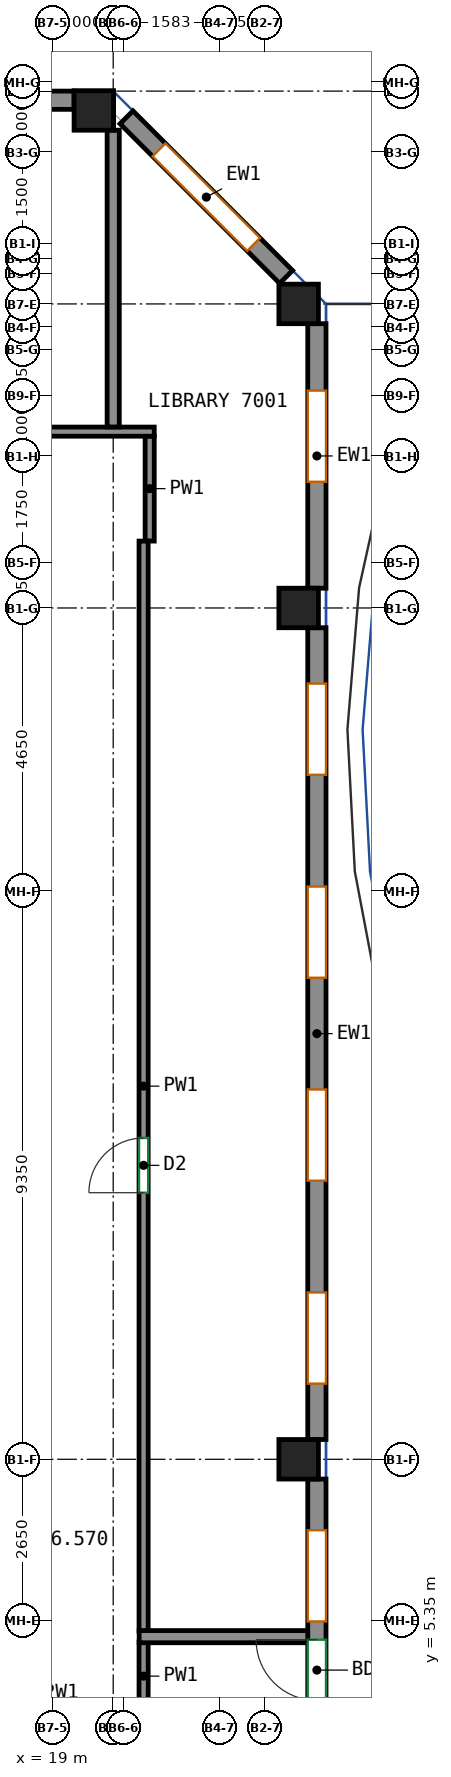
"""IFC4 building model, lengths in metres.
Left out: names, types, materials, properties, quantities, classifications, styles, units other than length and angle.
Written with IfcOpenShell. Run it as: python <this file> out.ifc"""

import sys

from ifc_helpers import new_model, si_unit, direction, frame, frame_2d, origin, origin_2d, place, context, subcontext, project, spatial, rectangle, extrude, source, transform, mapped, element, fill, save


model = new_model("IFC4")
c1 = context("Model", 3, precision=1e-05, world=origin(), true_north=direction((0.0, 1.0)))
c2 = subcontext(c1, "Body", "Model", "MODEL_VIEW")
j1 = project(units=[si_unit("LENGTHUNIT", "METRE"), si_unit("PLANEANGLEUNIT", "RADIAN")], contexts=[c1])
p1 = place(None, origin())
s1 = spatial("IfcSite", under=j1, at=p1, CompositionType="ELEMENT")
p2 = place(p1, origin())
s2 = spatial("IfcBuilding", under=s1, at=p2, CompositionType="ELEMENT")
p3 = place(p2, frame((0.0, 0.0, 284.0)))
s3 = spatial("IfcBuildingStorey", under=s2, at=p3, CompositionType="ELEMENT", Elevation=284.0)
m1 = source(origin(), c2, "Body", "SweptSolid", [
    extrude(rectangle(XDim=0.65, YDim=0.65, at=origin_2d()), origin(), (0.0, 0.0, 1.0), 3.12),
])
for number, where, z_axis, x_axis in (
    (1, (19.682, 30.182, 0.0), (0.0, 0.0, 1.0), (1.0, 0.0, 0.0)),
    (2, (23.05, 8.0, 0.0), (0.0, 0.0, 1.0), (1.0, 0.0, 0.0)),
    (3, (23.05, 22.0, 0.0), (0.0, 0.0, 1.0), (1.0, 0.0, 0.0)),
    (4, (23.05, 27.0, 0.0), (0.0, 0.0, 1.0), (1.0, 0.0, 0.0)),
):
    element("IfcColumn", number, at=place(p3, frame(where, z_axis=z_axis, x_axis=x_axis)), inside=s3, PredefinedType="COLUMN", context=c2, shape_type="MappedRepresentation", body=[
        mapped(m1, transform((0.0, 0.0, 0.0))),
    ])
m2 = source(origin(), c2, "Body", "SweptSolid", [
    extrude(rectangle(XDim=8.183, YDim=0.3, at=frame_2d((4.092, 0.0))), origin(), (0.0, 0.0, 1.0), 3.12),
])
p4 = place(p3, frame((23.35, -0.508, 0.0), z_axis=(0.0, 0.0, 1.0), x_axis=(0.0, 1.0, 0.0)))
e5 = element("IfcWall", 5, at=p4, inside=s3, PredefinedType="SOLIDWALL", context=c2, shape_type="MappedRepresentation", body=[
    mapped(m2, transform((0.0, 0.0, 0.0))),
])
p5 = place(p4, frame((1.75, 0.0, 0.8)))
e6 = element("IfcOpeningElement", 6, at=p5, cuts=e5, PredefinedType="OPENING", context=c2, shape_type="SweptSolid", body=[
    extrude(rectangle(XDim=1.5, YDim=2.05, at=frame_2d((0.75, 1.025))), frame((0.0, 0.16, 0.0), z_axis=(0.0, -1.0, 0.0), x_axis=(1.0, 0.0, 0.0)), (0.0, 0.0, 1.0), 0.32),
])
p6 = place(p4, frame((0.45, 0.0, 0.0)))
e7 = element("IfcOpeningElement", 7, at=p6, cuts=e5, PredefinedType="OPENING", context=c2, shape_type="SweptSolid", body=[
    extrude(rectangle(XDim=1.0, YDim=2.1, at=frame_2d((0.5, 1.05))), frame((0.0, 0.16, 0.0), z_axis=(0.0, -1.0, 0.0), x_axis=(1.0, 0.0, 0.0)), (0.0, 0.0, 1.0), 0.32),
])
p7 = place(p4, frame((5.842, 0.0, 0.8)))
e8 = element("IfcOpeningElement", 8, at=p7, cuts=e5, PredefinedType="OPENING", context=c2, shape_type="SweptSolid", body=[
    extrude(rectangle(XDim=1.5, YDim=2.05, at=frame_2d((0.75, 1.025))), frame((0.0, 0.16, 0.0), z_axis=(0.0, -1.0, 0.0), x_axis=(1.0, 0.0, 0.0)), (0.0, 0.0, 1.0), 0.32),
])
p8 = place(p4, frame((4.542, 0.0, 0.0)))
e9 = element("IfcOpeningElement", 9, at=p8, cuts=e5, PredefinedType="OPENING", context=c2, shape_type="SweptSolid", body=[
    extrude(rectangle(XDim=1.0, YDim=2.1, at=frame_2d((0.5, 1.05))), frame((0.0, 0.16, 0.0), z_axis=(0.0, -1.0, 0.0), x_axis=(1.0, 0.0, 0.0)), (0.0, 0.0, 1.0), 0.32),
])
m3 = source(origin(), c2, "Body", "SweptSolid", [
    extrude(rectangle(XDim=13.35, YDim=0.3, at=frame_2d((6.675, 0.0))), origin(), (0.0, 0.0, 1.0), 3.12),
])
p9 = place(p3, frame((23.35, 8.325, 0.0), z_axis=(0.0, 0.0, 1.0), x_axis=(0.0, 1.0, 0.0)))
e10 = element("IfcWall", 10, at=p9, inside=s3, PredefinedType="SOLIDWALL", context=c2, shape_type="MappedRepresentation", body=[
    mapped(m3, transform((0.0, 0.0, 0.0))),
])
p10 = place(p9, frame((0.919, 0.0, 0.8)))
e11 = element("IfcOpeningElement", 11, at=p10, cuts=e10, PredefinedType="OPENING", context=c2, shape_type="SweptSolid", body=[
    extrude(rectangle(XDim=1.5, YDim=2.05, at=frame_2d((0.75, 1.025))), frame((0.0, 0.16, 0.0), z_axis=(0.0, -1.0, 0.0), x_axis=(1.0, 0.0, 0.0)), (0.0, 0.0, 1.0), 0.32),
])
p11 = place(p9, frame((4.256, 0.0, 0.8)))
e12 = element("IfcOpeningElement", 12, at=p11, cuts=e10, PredefinedType="OPENING", context=c2, shape_type="SweptSolid", body=[
    extrude(rectangle(XDim=1.5, YDim=2.05, at=frame_2d((0.75, 1.025))), frame((0.0, 0.16, 0.0), z_axis=(0.0, -1.0, 0.0), x_axis=(1.0, 0.0, 0.0)), (0.0, 0.0, 1.0), 0.32),
])
p12 = place(p9, frame((7.594, 0.0, 0.8)))
e13 = element("IfcOpeningElement", 13, at=p12, cuts=e10, PredefinedType="OPENING", context=c2, shape_type="SweptSolid", body=[
    extrude(rectangle(XDim=1.5, YDim=2.05, at=frame_2d((0.75, 1.025))), frame((0.0, 0.16, 0.0), z_axis=(0.0, -1.0, 0.0), x_axis=(1.0, 0.0, 0.0)), (0.0, 0.0, 1.0), 0.32),
])
p13 = place(p9, frame((10.931, 0.0, 0.8)))
e14 = element("IfcOpeningElement", 14, at=p13, cuts=e10, PredefinedType="OPENING", context=c2, shape_type="SweptSolid", body=[
    extrude(rectangle(XDim=1.5, YDim=2.05, at=frame_2d((0.75, 1.025))), frame((0.0, 0.16, 0.0), z_axis=(0.0, -1.0, 0.0), x_axis=(1.0, 0.0, 0.0)), (0.0, 0.0, 1.0), 0.32),
])
m4 = source(origin(), c2, "Body", "SweptSolid", [
    extrude(rectangle(XDim=4.35, YDim=0.3, at=frame_2d((2.175, 0.0))), origin(), (0.0, 0.0, 1.0), 3.12),
])
p14 = place(p3, frame((23.35, 22.325, 0.0), z_axis=(0.0, 0.0, 1.0), x_axis=(0.0, 1.0, 0.0)))
e15 = element("IfcWall", 15, at=p14, inside=s3, PredefinedType="SOLIDWALL", context=c2, shape_type="MappedRepresentation", body=[
    mapped(m4, transform((0.0, 0.0, 0.0))),
])
p15 = place(p14, frame((1.75, 0.0, 0.8)))
e16 = element("IfcOpeningElement", 16, at=p15, cuts=e15, PredefinedType="OPENING", context=c2, shape_type="SweptSolid", body=[
    extrude(rectangle(XDim=1.5, YDim=2.05, at=frame_2d((0.75, 1.025))), frame((0.0, 0.16, 0.0), z_axis=(0.0, -1.0, 0.0), x_axis=(1.0, 0.0, 0.0)), (0.0, 0.0, 1.0), 0.32),
])
m5 = source(origin(), c2, "Body", "SweptSolid", [
    extrude(rectangle(XDim=3.712, YDim=0.3, at=frame_2d((1.856, 0.0))), origin(), (0.0, 0.0, 1.0), 3.12),
])
p16 = place(p3, frame((22.844, 27.444, 0.0), z_axis=(0.0, 0.0, 1.0), x_axis=(-0.707106781187, 0.707106781187, 0.0)))
e17 = element("IfcWall", 17, at=p16, inside=s3, PredefinedType="SOLIDWALL", context=c2, shape_type="MappedRepresentation", body=[
    mapped(m5, transform((0.0, 0.0, 0.0))),
])
p17 = place(p16, frame((0.756, 0.0, 0.8)))
e18 = element("IfcOpeningElement", 18, at=p17, cuts=e17, PredefinedType="OPENING", context=c2, shape_type="SweptSolid", body=[
    extrude(rectangle(XDim=2.2, YDim=2.05, at=frame_2d((1.1, 1.025))), frame((0.0, 0.16, 0.0), z_axis=(0.0, -1.0, 0.0), x_axis=(1.0, 0.0, 0.0)), (0.0, 0.0, 1.0), 0.32),
])
m6 = source(origin(), c2, "Body", "SweptSolid", [
    extrude(rectangle(XDim=6.032, YDim=0.3, at=frame_2d((3.016, 0.0))), origin(), (0.0, 0.0, 1.0), 3.12),
])
p18 = place(p3, frame((19.357, 30.35, 0.0), z_axis=(0.0, 0.0, 1.0), x_axis=(-1.0, 0.0, 0.0)))
e19 = element("IfcWall", 19, at=p18, inside=s3, PredefinedType="SOLIDWALL", context=c2, shape_type="MappedRepresentation", body=[
    mapped(m6, transform((0.0, 0.0, 0.0))),
])
p19 = place(p18, frame((0.408, 0.0, 0.8)))
e20 = element("IfcOpeningElement", 20, at=p19, cuts=e19, PredefinedType="OPENING", context=c2, shape_type="SweptSolid", body=[
    extrude(rectangle(XDim=2.2, YDim=2.05, at=frame_2d((1.1, 1.025))), frame((0.0, 0.16, 0.0), z_axis=(0.0, -1.0, 0.0), x_axis=(1.0, 0.0, 0.0)), (0.0, 0.0, 1.0), 0.32),
])
p20 = place(p18, frame((3.424, 0.0, 0.8)))
e21 = element("IfcOpeningElement", 21, at=p20, cuts=e19, PredefinedType="OPENING", context=c2, shape_type="SweptSolid", body=[
    extrude(rectangle(XDim=2.2, YDim=2.05, at=frame_2d((1.1, 1.025))), frame((0.0, 0.16, 0.0), z_axis=(0.0, -1.0, 0.0), x_axis=(1.0, 0.0, 0.0)), (0.0, 0.0, 1.0), 0.32),
])
p21 = place(p3, frame((20.5, 3.875, 0.0), z_axis=(0.0, 0.0, 1.0), x_axis=(0.0, 1.0, 0.0)))
e22 = element("IfcWall", 22, at=p21, inside=s3, PredefinedType="PARTITIONING", context=c2, shape_type="SweptSolid", body=[
    extrude(rectangle(XDim=1.118, YDim=0.15, at=frame_2d((0.559, 0.0))), origin(), (0.0, 0.0, 1.0), 3.12),
])
p22 = place(p3, frame((20.6, 23.1, 0.0), z_axis=(0.0, 0.0, 1.0), x_axis=(0.0, 1.0, 0.0)))
e23 = element("IfcWall", 23, at=p22, inside=s3, PredefinedType="PARTITIONING", context=c2, shape_type="SweptSolid", body=[
    extrude(rectangle(XDim=1.725, YDim=0.15, at=frame_2d((0.862, 0.0))), origin(), (0.0, 0.0, 1.0), 3.12),
])
p23 = place(p3, frame((20.5, 5.173, 0.0), z_axis=(0.0, 0.0, 1.0), x_axis=(0.0, 1.0, 0.0)))
e24 = element("IfcWall", 24, at=p23, inside=s3, PredefinedType="PARTITIONING", context=c2, shape_type="SweptSolid", body=[
    extrude(rectangle(XDim=17.927, YDim=0.15, at=frame_2d((8.963, 0.0))), origin(), (0.0, 0.0, 1.0), 3.12),
])
p24 = place(p23, frame((7.211, 0.0, 0.0)))
e25 = element("IfcOpeningElement", 25, at=p24, cuts=e24, PredefinedType="OPENING", context=c2, shape_type="SweptSolid", body=[
    extrude(rectangle(XDim=0.9, YDim=2.1, at=frame_2d((0.45, 1.05))), frame((0.0, 0.085, 0.0), z_axis=(0.0, -1.0, 0.0), x_axis=(1.0, 0.0, 0.0)), (0.0, 0.0, 1.0), 0.17),
])
p25 = place(p3, frame((-19.075, 24.9, 0.0), z_axis=(0.0, 0.0, 1.0), x_axis=(1.0, 0.0, 0.0)))
e26 = element("IfcWall", 26, at=p25, inside=s3, PredefinedType="PARTITIONING", context=c2, shape_type="SweptSolid", body=[
    extrude(rectangle(XDim=39.75, YDim=0.15, at=frame_2d((19.875, 0.0))), origin(), (0.0, 0.0, 1.0), 3.12),
])
p26 = place(p25, frame((11.365, 0.0, 0.0)))
e27 = element("IfcOpeningElement", 27, at=p26, cuts=e26, PredefinedType="OPENING", context=c2, shape_type="SweptSolid", body=[
    extrude(rectangle(XDim=1.0, YDim=2.1, at=frame_2d((0.5, 1.05))), frame((0.0, 0.085, 0.0), z_axis=(0.0, -1.0, 0.0), x_axis=(1.0, 0.0, 0.0)), (0.0, 0.0, 1.0), 0.17),
])
p27 = place(p25, frame((33.379, 0.0, 0.0)))
e28 = element("IfcOpeningElement", 28, at=p27, cuts=e26, PredefinedType="OPENING", context=c2, shape_type="SweptSolid", body=[
    extrude(rectangle(XDim=0.9, YDim=2.1, at=frame_2d((0.45, 1.05))), frame((0.0, 0.085, 0.0), z_axis=(0.0, -1.0, 0.0), x_axis=(1.0, 0.0, 0.0)), (0.0, 0.0, 1.0), 0.17),
])
p28 = place(p3, frame((23.25, 5.083, 0.0), z_axis=(0.0, 0.0, 1.0), x_axis=(-1.0, 0.0, 0.0)))
e29 = element("IfcWall", 29, at=p28, inside=s3, PredefinedType="PARTITIONING", context=c2, shape_type="SweptSolid", body=[
    extrude(rectangle(XDim=2.823, YDim=0.2, at=frame_2d((1.412, 0.0))), origin(), (0.0, 0.0, 1.0), 3.12),
])
p29 = place(p3, frame((20.0, 29.857, 0.0), z_axis=(0.0, 0.0, 1.0), x_axis=(0.0, -1.0, 0.0)))
e30 = element("IfcWall", 30, at=p29, inside=s3, PredefinedType="PARTITIONING", context=c2, shape_type="SweptSolid", body=[
    extrude(rectangle(XDim=4.88, YDim=0.2, at=frame_2d((2.44, 0.0))), origin(), (0.0, 0.0, 1.0), 3.12),
])
p30 = place(p7, origin())
e31 = element("IfcWindow", 31, at=p30, inside=s3, PartitioningType="SINGLE_PANEL", PredefinedType="WINDOW", context=c2, shape_type="SweptSolid", body=[
    extrude(rectangle(XDim=1.5, YDim=2.05, at=frame_2d((0.75, 1.025))), frame((0.0, 0.03, 0.0), z_axis=(0.0, -1.0, 0.0), x_axis=(1.0, 0.0, 0.0)), (0.0, 0.0, 1.0), 0.06),
])
fill(e8, e31)
p31 = place(p8, origin())
e32 = element("IfcDoor", 32, at=p31, inside=s3, OperationType="SINGLE_SWING_RIGHT", PredefinedType="DOOR", context=c2, shape_type="SweptSolid", body=[
    extrude(rectangle(XDim=1.0, YDim=2.1, at=frame_2d((0.5, 1.05))), frame((0.0, 0.025, 0.0), z_axis=(0.0, -1.0, 0.0), x_axis=(1.0, 0.0, 0.0)), (0.0, 0.0, 1.0), 0.05),
])
fill(e9, e32)
p32 = place(p10, origin())
e33 = element("IfcWindow", 33, at=p32, inside=s3, PartitioningType="SINGLE_PANEL", PredefinedType="WINDOW", context=c2, shape_type="SweptSolid", body=[
    extrude(rectangle(XDim=1.5, YDim=2.05, at=frame_2d((0.75, 1.025))), frame((0.0, 0.03, 0.0), z_axis=(0.0, -1.0, 0.0), x_axis=(1.0, 0.0, 0.0)), (0.0, 0.0, 1.0), 0.06),
])
fill(e11, e33)
p33 = place(p11, origin())
e34 = element("IfcWindow", 34, at=p33, inside=s3, PartitioningType="SINGLE_PANEL", PredefinedType="WINDOW", context=c2, shape_type="SweptSolid", body=[
    extrude(rectangle(XDim=1.5, YDim=2.05, at=frame_2d((0.75, 1.025))), frame((0.0, 0.03, 0.0), z_axis=(0.0, -1.0, 0.0), x_axis=(1.0, 0.0, 0.0)), (0.0, 0.0, 1.0), 0.06),
])
fill(e12, e34)
p34 = place(p12, origin())
e35 = element("IfcWindow", 35, at=p34, inside=s3, PartitioningType="SINGLE_PANEL", PredefinedType="WINDOW", context=c2, shape_type="SweptSolid", body=[
    extrude(rectangle(XDim=1.5, YDim=2.05, at=frame_2d((0.75, 1.025))), frame((0.0, 0.03, 0.0), z_axis=(0.0, -1.0, 0.0), x_axis=(1.0, 0.0, 0.0)), (0.0, 0.0, 1.0), 0.06),
])
fill(e13, e35)
p35 = place(p13, origin())
e36 = element("IfcWindow", 36, at=p35, inside=s3, PartitioningType="SINGLE_PANEL", PredefinedType="WINDOW", context=c2, shape_type="SweptSolid", body=[
    extrude(rectangle(XDim=1.5, YDim=2.05, at=frame_2d((0.75, 1.025))), frame((0.0, 0.03, 0.0), z_axis=(0.0, -1.0, 0.0), x_axis=(1.0, 0.0, 0.0)), (0.0, 0.0, 1.0), 0.06),
])
fill(e14, e36)
p36 = place(p15, origin())
e37 = element("IfcWindow", 37, at=p36, inside=s3, PartitioningType="SINGLE_PANEL", PredefinedType="WINDOW", context=c2, shape_type="SweptSolid", body=[
    extrude(rectangle(XDim=1.5, YDim=2.05, at=frame_2d((0.75, 1.025))), frame((0.0, 0.03, 0.0), z_axis=(0.0, -1.0, 0.0), x_axis=(1.0, 0.0, 0.0)), (0.0, 0.0, 1.0), 0.06),
])
fill(e16, e37)
p37 = place(p17, origin())
e38 = element("IfcWindow", 38, at=p37, inside=s3, PartitioningType="SINGLE_PANEL", PredefinedType="WINDOW", context=c2, shape_type="SweptSolid", body=[
    extrude(rectangle(XDim=2.2, YDim=2.05, at=frame_2d((1.1, 1.025))), frame((0.0, 0.03, 0.0), z_axis=(0.0, -1.0, 0.0), x_axis=(1.0, 0.0, 0.0)), (0.0, 0.0, 1.0), 0.06),
])
fill(e18, e38)
p38 = place(p24, origin())
e39 = element("IfcDoor", 39, at=p38, inside=s3, OperationType="SINGLE_SWING_LEFT", PredefinedType="DOOR", context=c2, shape_type="SweptSolid", body=[
    extrude(rectangle(XDim=0.9, YDim=2.1, at=frame_2d((0.45, 1.05))), frame((0.0, 0.025, 0.0), z_axis=(0.0, -1.0, 0.0), x_axis=(1.0, 0.0, 0.0)), (0.0, 0.0, 1.0), 0.05),
])
fill(e25, e39)
save(model, sys.argv[1])
